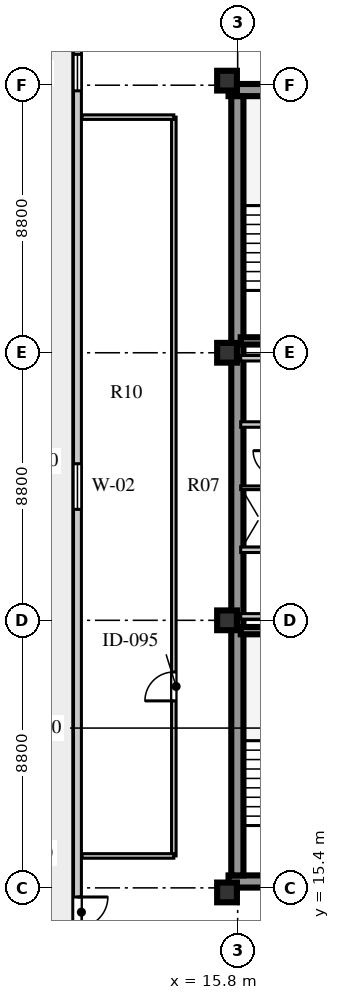
"""IFC4 building model, lengths in metres.
Left out: names, types, materials, properties, quantities, classifications, styles, units other than length and angle.
Written with IfcOpenShell. Run it as: python <this file> out.ifc"""

import sys

from ifc_helpers import new_model, si_unit, direction, frame, frame_2d, origin, origin_2d, place, context, subcontext, project, spatial, rectangle, extrude, element, fill, save


model = new_model("IFC4")
c1 = context("Model", 3, precision=1e-05, world=origin(), true_north=direction((0.0, 1.0)))
c2 = subcontext(c1, "Body", "Model", "MODEL_VIEW")
j1 = project(units=[si_unit("LENGTHUNIT", "METRE"), si_unit("PLANEANGLEUNIT", "RADIAN")], contexts=[c1])
p1 = place(None, origin())
s1 = spatial("IfcSite", under=j1, at=p1, CompositionType="ELEMENT")
p2 = place(p1, origin())
s2 = spatial("IfcBuilding", under=s1, at=p2, CompositionType="ELEMENT")
p3 = place(p2, frame((0.0, 0.0, 320.1)))
s3 = spatial("IfcBuildingStorey", under=s2, at=p3, CompositionType="ELEMENT", Elevation=320.1)
for number, where, z_axis, x_axis in (
    (1, (15.5, 15.61, 0.0), (0.0, 0.0, 1.0), (1.0, 0.0, 0.0)),
    (2, (15.5, 41.64, 0.0), (0.0, 0.0, 1.0), (1.0, 0.0, 0.0)),
):
    element("IfcWall", number, at=place(p3, frame(where, z_axis=z_axis, x_axis=x_axis)), inside=s3, PredefinedType="SHEAR", context=c2, shape_type="SweptSolid", body=[
        extrude(rectangle(XDim=9.48, YDim=0.4, at=frame_2d((4.74, 0.0))), origin(), (0.0, 0.0, 1.0), 3.56),
    ])
p4 = place(p3, frame((15.79, 15.81, 0.0), z_axis=(0.0, 0.0, 1.0), x_axis=(0.0, 1.0, 0.0)))
e3 = element("IfcWall", 3, at=p4, inside=s3, PredefinedType="SHEAR", context=c2, shape_type="SweptSolid", body=[
    extrude(rectangle(XDim=25.63, YDim=0.4, at=frame_2d((12.815, 0.0))), origin(), (0.0, 0.0, 1.0), 3.56),
])
for number, where, z_axis, x_axis in (
    (4, (15.45, 15.25, 0.0), (0.0, 0.0, 1.0), (1.0, 0.0, 0.0)),
    (5, (15.45, 24.2, 0.0), (0.0, 0.0, 1.0), (1.0, 0.0, 0.0)),
    (6, (15.45, 33.0, 0.0), (0.0, 0.0, 1.0), (1.0, 0.0, 0.0)),
    (7, (15.45, 41.95, 0.0), (0.0, 0.0, 1.0), (1.0, 0.0, 0.0)),
):
    element("IfcColumn", number, at=place(p3, frame(where, z_axis=z_axis, x_axis=x_axis)), inside=s3, PredefinedType="COLUMN", context=c2, shape_type="SweptSolid", body=[
        extrude(rectangle(XDim=0.65, YDim=0.65, at=origin_2d()), origin(), (0.0, 0.0, 1.0), 3.56),
    ])
p5 = place(p3, frame((10.53, 43.79, 0.0), z_axis=(0.0, 0.0, 1.0), x_axis=(0.0, -1.0, 0.0)))
e8 = element("IfcWall", 8, at=p5, inside=s3, PredefinedType="SOLIDWALL", context=c2, shape_type="SweptSolid", body=[
    extrude(rectangle(XDim=30.38, YDim=0.26, at=frame_2d((15.19, 0.0))), origin(), (0.0, 0.0, 1.0), 3.56),
])
p6 = place(p5, frame((28.69, 0.0, 0.0)))
e9 = element("IfcOpeningElement", 9, at=p6, cuts=e8, PredefinedType="OPENING", context=c2, shape_type="SweptSolid", body=[
    extrude(rectangle(XDim=1.0, YDim=2.05, at=frame_2d((0.5, 1.025))), frame((0.0, 0.14, 0.0), z_axis=(0.0, -1.0, 0.0), x_axis=(1.0, 0.0, 0.0)), (0.0, 0.0, 1.0), 0.28),
])
p7 = place(p5, frame((14.44, 0.0, 0.8)))
e10 = element("IfcOpeningElement", 10, at=p7, cuts=e8, PredefinedType="OPENING", context=c2, shape_type="SweptSolid", body=[
    extrude(rectangle(XDim=1.5, YDim=2.0, at=frame_2d((0.75, 1.0))), frame((0.0, 0.14, 0.0), z_axis=(0.0, -1.0, 0.0), x_axis=(1.0, 0.0, 0.0)), (0.0, 0.0, 1.0), 0.28),
])
p8 = place(p5, frame((0.975, 0.0, 0.8)))
e11 = element("IfcOpeningElement", 11, at=p8, cuts=e8, PredefinedType="OPENING", context=c2, shape_type="SweptSolid", body=[
    extrude(rectangle(XDim=1.2, YDim=1.75, at=frame_2d((0.6, 0.875))), frame((0.0, 0.14, 0.0), z_axis=(0.0, -1.0, 0.0), x_axis=(1.0, 0.0, 0.0)), (0.0, 0.0, 1.0), 0.28),
])
p9 = place(p3, frame((15.9, 23.86, 0.0), z_axis=(0.0, 0.0, 1.0), x_axis=(1.0, 0.0, 0.0)))
e12 = element("IfcWall", 12, at=p9, inside=s3, PredefinedType="SHEAR", context=c2, shape_type="SweptSolid", body=[
    extrude(rectangle(XDim=3.52, YDim=0.24, at=frame_2d((1.76, 0.0))), origin(), (0.0, 0.0, 1.0), 3.8),
])
p10 = place(p3, frame((15.9, 26.52, 0.0), z_axis=(0.0, 0.0, 1.0), x_axis=(1.0, 0.0, 0.0)))
e13 = element("IfcWall", 13, at=p10, inside=s3, PredefinedType="SOLIDWALL", context=c2, shape_type="SweptSolid", body=[
    extrude(rectangle(XDim=8.68, YDim=0.18, at=frame_2d((4.34, 0.0))), origin(), (0.0, 0.0, 1.0), 3.56),
])
p11 = place(p10, frame((2.5, 0.0, 0.0)))
e14 = element("IfcOpeningElement", 14, at=p11, cuts=e13, PredefinedType="OPENING", context=c2, shape_type="SweptSolid", body=[
    extrude(rectangle(XDim=0.95, YDim=2.1, at=frame_2d((0.475, 1.05))), frame((0.0, 0.1, 0.0), z_axis=(0.0, -1.0, 0.0), x_axis=(1.0, 0.0, 0.0)), (0.0, 0.0, 1.0), 0.2),
])
p12 = place(p10, frame((6.0, 0.0, 0.0)))
e15 = element("IfcOpeningElement", 15, at=p12, cuts=e13, PredefinedType="OPENING", context=c2, shape_type="SweptSolid", body=[
    extrude(rectangle(XDim=0.95, YDim=2.1, at=frame_2d((0.475, 1.05))), frame((0.0, 0.1, 0.0), z_axis=(0.0, -1.0, 0.0), x_axis=(1.0, 0.0, 0.0)), (0.0, 0.0, 1.0), 0.2),
])
p13 = place(p3, frame((15.9, 24.33, 0.0), z_axis=(0.0, 0.0, 1.0), x_axis=(1.0, 0.0, 0.0)))
e16 = element("IfcWall", 16, at=p13, inside=s3, PredefinedType="SOLIDWALL", context=c2, shape_type="SweptSolid", body=[
    extrude(rectangle(XDim=8.68, YDim=0.18, at=frame_2d((4.34, 0.0))), origin(), (0.0, 0.0, 1.0), 2.96),
])
p14 = place(p3, frame((15.9, 28.56, 0.0), z_axis=(0.0, 0.0, 1.0), x_axis=(1.0, 0.0, 0.0)))
e17 = element("IfcWall", 17, at=p14, inside=s3, PredefinedType="PARTITIONING", context=c2, shape_type="SweptSolid", body=[
    extrude(rectangle(XDim=1.2, YDim=0.12, at=frame_2d((0.6, 0.0))), origin(), (0.0, 0.0, 1.0), 3.56),
])
p15 = place(p3, frame((15.9, 30.64, 0.0), z_axis=(0.0, 0.0, 1.0), x_axis=(1.0, 0.0, 0.0)))
e18 = element("IfcWall", 18, at=p15, inside=s3, PredefinedType="SOLIDWALL", context=c2, shape_type="SweptSolid", body=[
    extrude(rectangle(XDim=8.68, YDim=0.18, at=frame_2d((4.34, 0.0))), origin(), (0.0, 0.0, 1.0), 3.56),
])
p16 = place(p15, frame((3.7, 0.0, 0.0)))
e19 = element("IfcOpeningElement", 19, at=p16, cuts=e18, PredefinedType="OPENING", context=c2, shape_type="SweptSolid", body=[
    extrude(rectangle(XDim=0.95, YDim=2.1, at=frame_2d((0.475, 1.05))), frame((0.0, 0.1, 0.0), z_axis=(0.0, -1.0, 0.0), x_axis=(1.0, 0.0, 0.0)), (0.0, 0.0, 1.0), 0.2),
])
p17 = place(p3, frame((15.9, 32.82, 0.0), z_axis=(0.0, 0.0, 1.0), x_axis=(1.0, 0.0, 0.0)))
e20 = element("IfcWall", 20, at=p17, inside=s3, PredefinedType="SOLIDWALL", context=c2, shape_type="SweptSolid", body=[
    extrude(rectangle(XDim=8.68, YDim=0.18, at=frame_2d((4.34, 0.0))), origin(), (0.0, 0.0, 1.0), 2.96),
])
p18 = place(p3, frame((15.9, 33.39, 0.0), z_axis=(0.0, 0.0, 1.0), x_axis=(1.0, 0.0, 0.0)))
e21 = element("IfcWall", 21, at=p18, inside=s3, PredefinedType="SHEAR", context=c2, shape_type="SweptSolid", body=[
    extrude(rectangle(XDim=3.52, YDim=0.24, at=frame_2d((1.76, 0.0))), origin(), (0.0, 0.0, 1.0), 3.8),
])
p19 = place(p3, frame((13.7, 16.45, 0.0), z_axis=(0.0, 0.0, 1.0), x_axis=(0.0, 1.0, 0.0)))
e22 = element("IfcWall", 22, at=p19, inside=s3, PredefinedType="PARTITIONING", context=c2, shape_type="SweptSolid", body=[
    extrude(rectangle(XDim=24.3, YDim=0.15, at=frame_2d((12.15, 0.0))), origin(), (0.0, 0.0, 1.0), 3.56),
])
p20 = place(p19, frame((5.1, 0.0, 0.0)))
e23 = element("IfcOpeningElement", 23, at=p20, cuts=e22, PredefinedType="OPENING", context=c2, shape_type="SweptSolid", body=[
    extrude(rectangle(XDim=0.95, YDim=2.08, at=frame_2d((0.475, 1.04))), frame((0.0, 0.085, 0.0), z_axis=(0.0, -1.0, 0.0), x_axis=(1.0, 0.0, 0.0)), (0.0, 0.0, 1.0), 0.17),
])
for number, where, z_axis, x_axis in (
    (24, (10.68, 16.45, 0.0), (0.0, 0.0, 1.0), (1.0, 0.0, 0.0)),
    (25, (10.68, 40.75, 0.0), (0.0, 0.0, 1.0), (1.0, 0.0, 0.0)),
):
    element("IfcWall", number, at=place(p3, frame(where, z_axis=z_axis, x_axis=x_axis)), inside=s3, PredefinedType="PARTITIONING", context=c2, shape_type="SweptSolid", body=[
        extrude(rectangle(XDim=3.02, YDim=0.15, at=frame_2d((1.51, 0.0))), origin(), (0.0, 0.0, 1.0), 3.56),
    ])
p21 = place(p6, frame((1.0, 0.0, 0.0), z_axis=(0.0, 0.0, 1.0), x_axis=(-1.0, 0.0, 0.0)))
e26 = element("IfcDoor", 26, at=p21, inside=s3, OperationType="SINGLE_SWING_RIGHT", PredefinedType="DOOR", context=c2, shape_type="SweptSolid", body=[
    extrude(rectangle(XDim=1.0, YDim=2.05, at=frame_2d((0.5, 1.025))), frame((0.0, 0.025, 0.0), z_axis=(0.0, -1.0, 0.0), x_axis=(1.0, 0.0, 0.0)), (0.0, 0.0, 1.0), 0.05),
])
fill(e9, e26)
p22 = place(p7, origin())
e27 = element("IfcWindow", 27, at=p22, inside=s3, PartitioningType="SINGLE_PANEL", PredefinedType="WINDOW", context=c2, shape_type="SweptSolid", body=[
    extrude(rectangle(XDim=1.5, YDim=2.0, at=frame_2d((0.75, 1.0))), frame((0.0, 0.03, 0.0), z_axis=(0.0, -1.0, 0.0), x_axis=(1.0, 0.0, 0.0)), (0.0, 0.0, 1.0), 0.06),
])
fill(e10, e27)
p23 = place(p8, origin())
e28 = element("IfcWindow", 28, at=p23, inside=s3, PartitioningType="SINGLE_PANEL", PredefinedType="WINDOW", context=c2, shape_type="SweptSolid", body=[
    extrude(rectangle(XDim=1.2, YDim=1.75, at=frame_2d((0.6, 0.875))), frame((0.0, 0.03, 0.0), z_axis=(0.0, -1.0, 0.0), x_axis=(1.0, 0.0, 0.0)), (0.0, 0.0, 1.0), 0.06),
])
fill(e11, e28)
p24 = place(p20, origin())
e29 = element("IfcDoor", 29, at=p24, inside=s3, OperationType="SINGLE_SWING_LEFT", PredefinedType="DOOR", context=c2, shape_type="SweptSolid", body=[
    extrude(rectangle(XDim=0.95, YDim=2.08, at=frame_2d((0.475, 1.04))), frame((0.0, 0.025, 0.0), z_axis=(0.0, -1.0, 0.0), x_axis=(1.0, 0.0, 0.0)), (0.0, 0.0, 1.0), 0.05),
])
fill(e23, e29)
save(model, sys.argv[1])
